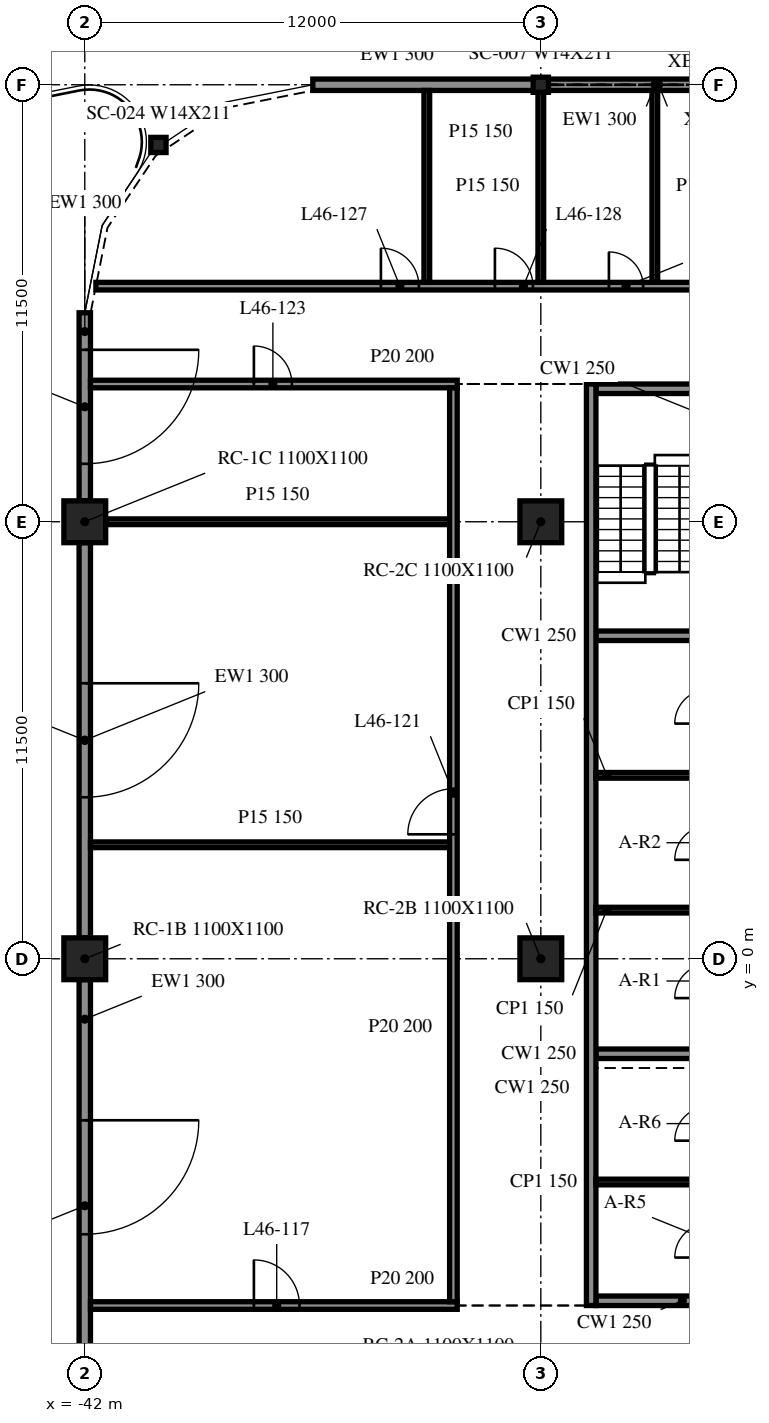
"""IFC4 building model, lengths in metres.
Left out: names, types, materials, properties, quantities, classifications, styles, units other than length and angle.
Written with IfcOpenShell. Run it as: python <this file> out.ifc"""

import sys

from ifc_helpers import new_model, si_unit, direction, frame, frame_2d, origin, origin_2d, place, context, subcontext, project, spatial, rectangle, i_section, extrude, element, fill, save


model = new_model("IFC4")
c1 = context("Model", 3, precision=1e-05, world=origin(), true_north=direction((0.0, 1.0)))
c2 = subcontext(c1, "Body", "Model", "MODEL_VIEW")
j1 = project(units=[si_unit("LENGTHUNIT", "METRE"), si_unit("PLANEANGLEUNIT", "RADIAN")], contexts=[c1])
p1 = place(None, origin())
s1 = spatial("IfcSite", under=j1, at=p1, CompositionType="ELEMENT")
p2 = place(p1, origin())
s2 = spatial("IfcBuilding", under=s1, at=p2, CompositionType="ELEMENT")
p3 = place(p2, frame((0.0, 0.0, 193.9)))
s3 = spatial("IfcBuildingStorey", under=s2, at=p3, CompositionType="ELEMENT", Elevation=193.9)
for number, where, z_axis, x_axis in (
    (1, (-42.0, 0.0, -0.34), (0.0, 0.0, 1.0), (1.0, 0.0, 0.0)),
    (2, (-42.0, 11.5, -0.34), (0.0, 0.0, 1.0), (1.0, 0.0, 0.0)),
    (3, (-30.0, 0.0, -0.34), (0.0, 0.0, 1.0), (1.0, 0.0, 0.0)),
    (4, (-30.0, 11.5, -0.34), (0.0, 0.0, 1.0), (1.0, 0.0, 0.0)),
):
    element("IfcColumn", number, at=place(p3, frame(where, z_axis=z_axis, x_axis=x_axis)), inside=s3, PredefinedType="COLUMN", context=c2, shape_type="SweptSolid", body=[
        extrude(rectangle(XDim=1.1, YDim=1.1, at=origin_2d()), origin(), (0.0, 0.0, 1.0), 3.8),
    ])
for number, where, z_axis, x_axis in (
    (5, (-30.0, 23.0, -0.34), (0.0, 0.0, 1.0), (1.0, 0.0, 0.0)),
    (6, (-40.062, 21.416, -0.34), (0.0, 0.0, 1.0), (1.0, 0.0, 0.0)),
):
    element("IfcColumn", number, at=place(p3, frame(where, z_axis=z_axis, x_axis=x_axis)), inside=s3, PredefinedType="COLUMN", context=c2, shape_type="SweptSolid", body=[
        extrude(i_section(OverallWidth=0.401, OverallDepth=0.399, WebThickness=0.025, FlangeThickness=0.04, at=origin_2d()), origin(), (0.0, 0.0, 1.0), 3.8),
    ])
p4 = place(p3, frame((-18.012, 23.0, 0.0), z_axis=(0.0, 0.0, 1.0), x_axis=(-1.0, 0.0, 0.0)))
e7 = element("IfcWall", 7, at=p4, inside=s3, PredefinedType="NOTDEFINED", context=c2, shape_type="SweptSolid", body=[
    extrude(rectangle(XDim=11.975, YDim=0.3, at=frame_2d((5.988, 0.0))), origin(), (0.0, 0.0, 1.0), 2.782),
])
p5 = place(p3, frame((-30.012, 23.0, 0.0), z_axis=(0.0, 0.0, 1.0), x_axis=(-1.0, 0.0, 0.0)))
e8 = element("IfcWall", 8, at=p5, inside=s3, PredefinedType="NOTDEFINED", context=c2, shape_type="SweptSolid", body=[
    extrude(rectangle(XDim=5.988, YDim=0.3, at=frame_2d((2.994, 0.0))), origin(), (0.0, 0.0, 1.0), 2.782),
])
p6 = place(p3, frame((-42.0, 17.0, 0.0), z_axis=(0.0, 0.0, 1.0), x_axis=(0.0, -1.0, 0.0)))
e9 = element("IfcWall", 9, at=p6, inside=s3, PredefinedType="NOTDEFINED", context=c2, shape_type="SweptSolid", body=[
    extrude(rectangle(XDim=4.95, YDim=0.3, at=frame_2d((2.475, 0.0))), origin(), (0.0, 0.0, 1.0), 2.782),
])
p7 = place(p6, frame((0.975, 0.0, 0.0)))
e10 = element("IfcOpeningElement", 10, at=p7, cuts=e9, PredefinedType="OPENING", context=c2, shape_type="SweptSolid", body=[
    extrude(rectangle(XDim=3.0, YDim=2.4, at=frame_2d((1.5, 1.2))), frame((0.0, 0.16, 0.0), z_axis=(0.0, -1.0, 0.0), x_axis=(1.0, 0.0, 0.0)), (0.0, 0.0, 1.0), 0.32),
])
p8 = place(p3, frame((-42.0, 10.95, 0.0), z_axis=(0.0, 0.0, 1.0), x_axis=(0.0, -1.0, 0.0)))
e11 = element("IfcWall", 11, at=p8, inside=s3, PredefinedType="NOTDEFINED", context=c2, shape_type="SweptSolid", body=[
    extrude(rectangle(XDim=10.4, YDim=0.3, at=frame_2d((5.2, 0.0))), origin(), (0.0, 0.0, 1.0), 2.782),
])
p9 = place(p8, frame((3.7, 0.0, 0.0)))
e12 = element("IfcOpeningElement", 12, at=p9, cuts=e11, PredefinedType="OPENING", context=c2, shape_type="SweptSolid", body=[
    extrude(rectangle(XDim=3.0, YDim=2.4, at=frame_2d((1.5, 1.2))), frame((0.0, 0.16, 0.0), z_axis=(0.0, -1.0, 0.0), x_axis=(1.0, 0.0, 0.0)), (0.0, 0.0, 1.0), 0.32),
])
p10 = place(p3, frame((-42.0, -0.55, 0.0), z_axis=(0.0, 0.0, 1.0), x_axis=(0.0, -1.0, 0.0)))
e13 = element("IfcWall", 13, at=p10, inside=s3, PredefinedType="NOTDEFINED", context=c2, shape_type="SweptSolid", body=[
    extrude(rectangle(XDim=10.4, YDim=0.3, at=frame_2d((5.2, 0.0))), origin(), (0.0, 0.0, 1.0), 2.782),
])
p11 = place(p10, frame((3.7, 0.0, 0.0)))
e14 = element("IfcOpeningElement", 14, at=p11, cuts=e13, PredefinedType="OPENING", context=c2, shape_type="SweptSolid", body=[
    extrude(rectangle(XDim=3.0, YDim=2.4, at=frame_2d((1.5, 1.2))), frame((0.0, 0.16, 0.0), z_axis=(0.0, -1.0, 0.0), x_axis=(1.0, 0.0, 0.0)), (0.0, 0.0, 1.0), 0.32),
])
p12 = place(p3, frame((-28.675, 15.125, 0.0), z_axis=(0.0, 0.0, 1.0), x_axis=(0.0, -1.0, 0.0)))
e15 = element("IfcWall", 15, at=p12, inside=s3, PredefinedType="SOLIDWALL", context=c2, shape_type="SweptSolid", body=[
    extrude(rectangle(XDim=24.25, YDim=0.25, at=frame_2d((12.125, 0.0))), origin(), (0.0, 0.0, 1.0), 3.46),
])
p13 = place(p3, frame((-19.45, -9.0, 0.0), z_axis=(0.0, 0.0, 1.0), x_axis=(-1.0, 0.0, 0.0)))
e16 = element("IfcWall", 16, at=p13, inside=s3, PredefinedType="SOLIDWALL", context=c2, shape_type="SweptSolid", body=[
    extrude(rectangle(XDim=9.1, YDim=0.25, at=frame_2d((4.55, 0.0))), origin(), (0.0, 0.0, 1.0), 3.46),
])
p14 = place(p13, frame((3.65, 0.0, 0.0)))
e17 = element("IfcOpeningElement", 17, at=p14, cuts=e16, PredefinedType="OPENING", context=c2, shape_type="SweptSolid", body=[
    extrude(rectangle(XDim=1.8, YDim=2.1, at=frame_2d((0.9, 1.05))), frame((0.0, 0.135, 0.0), z_axis=(0.0, -1.0, 0.0), x_axis=(1.0, 0.0, 0.0)), (0.0, 0.0, 1.0), 0.27),
])
p15 = place(p3, frame((-28.55, 15.0, 0.0), z_axis=(0.0, 0.0, 1.0), x_axis=(1.0, 0.0, 0.0)))
e18 = element("IfcWall", 18, at=p15, inside=s3, PredefinedType="SOLIDWALL", context=c2, shape_type="SweptSolid", body=[
    extrude(rectangle(XDim=9.1, YDim=0.25, at=frame_2d((4.55, 0.0))), origin(), (0.0, 0.0, 1.0), 3.46),
])
p16 = place(p15, frame((3.65, 0.0, 0.0)))
e19 = element("IfcOpeningElement", 19, at=p16, cuts=e18, PredefinedType="OPENING", context=c2, shape_type="SweptSolid", body=[
    extrude(rectangle(XDim=1.8, YDim=2.1, at=frame_2d((0.9, 1.05))), frame((0.0, 0.135, 0.0), z_axis=(0.0, -1.0, 0.0), x_axis=(1.0, 0.0, 0.0)), (0.0, 0.0, 1.0), 0.27),
])
for number, where, z_axis, x_axis in (
    (20, (-28.55, -2.5, 0.0), (0.0, 0.0, 1.0), (1.0, 0.0, 0.0)),
    (21, (-28.55, 8.5, 0.0), (0.0, 0.0, 1.0), (1.0, 0.0, 0.0)),
):
    element("IfcWall", number, at=place(p3, frame(where, z_axis=z_axis, x_axis=x_axis)), inside=s3, PredefinedType="SOLIDWALL", context=c2, shape_type="SweptSolid", body=[
        extrude(rectangle(XDim=2.85, YDim=0.25, at=frame_2d((1.425, 0.0))), origin(), (0.0, 0.0, 1.0), 3.46),
    ])
for number, where, z_axis, x_axis in (
    (22, (-28.55, 1.28, 0.0), (0.0, 0.0, 1.0), (1.0, 0.0, 0.0)),
    (23, (-28.55, 4.827, 0.0), (0.0, 0.0, 1.0), (1.0, 0.0, 0.0)),
    (24, (-28.55, -5.875, 0.0), (0.0, 0.0, 1.0), (1.0, 0.0, 0.0)),
):
    element("IfcWall", number, at=place(p3, frame(where, z_axis=z_axis, x_axis=x_axis)), inside=s3, PredefinedType="PARTITIONING", context=c2, shape_type="SweptSolid", body=[
        extrude(rectangle(XDim=2.85, YDim=0.15, at=frame_2d((1.425, 0.0))), origin(), (0.0, 0.0, 1.0), 3.46),
    ])
p17 = place(p3, frame((-41.85, -9.125, 0.0), z_axis=(0.0, 0.0, 1.0), x_axis=(1.0, 0.0, 0.0)))
e25 = element("IfcWall", 25, at=p17, inside=s3, PredefinedType="PARTITIONING", context=c2, shape_type="SweptSolid", body=[
    extrude(rectangle(XDim=9.65, YDim=0.2, at=frame_2d((4.825, 0.0))), origin(), (0.0, 0.0, 1.0), 3.46),
])
p18 = place(p17, frame((4.3, 0.0, 0.0)))
e26 = element("IfcOpeningElement", 26, at=p18, cuts=e25, PredefinedType="OPENING", context=c2, shape_type="SweptSolid", body=[
    extrude(rectangle(XDim=1.2, YDim=2.1, at=frame_2d((0.6, 1.05))), frame((0.0, 0.11, 0.0), z_axis=(0.0, -1.0, 0.0), x_axis=(1.0, 0.0, 0.0)), (0.0, 0.0, 1.0), 0.22),
])
p19 = place(p3, frame((-41.85, 3.0, 0.0), z_axis=(0.0, 0.0, 1.0), x_axis=(1.0, 0.0, 0.0)))
e27 = element("IfcWall", 27, at=p19, inside=s3, PredefinedType="PARTITIONING", context=c2, shape_type="SweptSolid", body=[
    extrude(rectangle(XDim=9.45, YDim=0.15, at=frame_2d((4.725, 0.0))), origin(), (0.0, 0.0, 1.0), 3.46),
])
p20 = place(p3, frame((-41.45, 11.5, 0.0), z_axis=(0.0, 0.0, 1.0), x_axis=(1.0, 0.0, 0.0)))
e28 = element("IfcWall", 28, at=p20, inside=s3, PredefinedType="PARTITIONING", context=c2, shape_type="SweptSolid", body=[
    extrude(rectangle(XDim=9.05, YDim=0.15, at=frame_2d((4.525, 0.0))), origin(), (0.0, 0.0, 1.0), 3.46),
])
p21 = place(p3, frame((-41.85, 15.125, 0.0), z_axis=(0.0, 0.0, 1.0), x_axis=(1.0, 0.0, 0.0)))
e29 = element("IfcWall", 29, at=p21, inside=s3, PredefinedType="PARTITIONING", context=c2, shape_type="SweptSolid", body=[
    extrude(rectangle(XDim=9.65, YDim=0.2, at=frame_2d((4.825, 0.0))), origin(), (0.0, 0.0, 1.0), 3.46),
])
p22 = place(p21, frame((4.3, 0.0, 0.0)))
e30 = element("IfcOpeningElement", 30, at=p22, cuts=e29, PredefinedType="OPENING", context=c2, shape_type="SweptSolid", body=[
    extrude(rectangle(XDim=1.0, YDim=2.1, at=frame_2d((0.5, 1.05))), frame((0.0, 0.11, 0.0), z_axis=(0.0, -1.0, 0.0), x_axis=(1.0, 0.0, 0.0)), (0.0, 0.0, 1.0), 0.22),
])
p23 = place(p3, frame((-41.708, 17.7, 0.0), z_axis=(0.0, 0.0, 1.0), x_axis=(1.0, 0.0, 0.0)))
e31 = element("IfcWall", 31, at=p23, inside=s3, PredefinedType="PARTITIONING", context=c2, shape_type="SweptSolid", body=[
    extrude(rectangle(XDim=95.416, YDim=0.2, at=frame_2d((47.708, 0.0))), origin(), (0.0, 0.0, 1.0), 3.46),
])
p24 = place(p23, frame((7.5, 0.0, 0.0)))
e32 = element("IfcOpeningElement", 32, at=p24, cuts=e31, PredefinedType="OPENING", context=c2, shape_type="SweptSolid", body=[
    extrude(rectangle(XDim=1.0, YDim=2.1, at=frame_2d((0.5, 1.05))), frame((0.0, 0.11, 0.0), z_axis=(0.0, -1.0, 0.0), x_axis=(1.0, 0.0, 0.0)), (0.0, 0.0, 1.0), 0.22),
])
p25 = place(p23, frame((10.5, 0.0, 0.0)))
e33 = element("IfcOpeningElement", 33, at=p25, cuts=e31, PredefinedType="OPENING", context=c2, shape_type="SweptSolid", body=[
    extrude(rectangle(XDim=1.0, YDim=2.1, at=frame_2d((0.5, 1.05))), frame((0.0, 0.11, 0.0), z_axis=(0.0, -1.0, 0.0), x_axis=(1.0, 0.0, 0.0)), (0.0, 0.0, 1.0), 0.22),
])
p26 = place(p23, frame((13.5, 0.0, 0.0)))
e34 = element("IfcOpeningElement", 34, at=p26, cuts=e31, PredefinedType="OPENING", context=c2, shape_type="SweptSolid", body=[
    extrude(rectangle(XDim=0.9, YDim=2.1, at=frame_2d((0.45, 1.05))), frame((0.0, 0.11, 0.0), z_axis=(0.0, -1.0, 0.0), x_axis=(1.0, 0.0, 0.0)), (0.0, 0.0, 1.0), 0.22),
])
p27 = place(p23, frame((22.3, 0.0, 0.0)))
e35 = element("IfcOpeningElement", 35, at=p27, cuts=e31, PredefinedType="OPENING", context=c2, shape_type="SweptSolid", body=[
    extrude(rectangle(XDim=1.2, YDim=2.1, at=frame_2d((0.6, 1.05))), frame((0.0, 0.11, 0.0), z_axis=(0.0, -1.0, 0.0), x_axis=(1.0, 0.0, 0.0)), (0.0, 0.0, 1.0), 0.22),
])
p28 = place(p23, frame((28.5, 0.0, 0.0)))
e36 = element("IfcOpeningElement", 36, at=p28, cuts=e31, PredefinedType="OPENING", context=c2, shape_type="SweptSolid", body=[
    extrude(rectangle(XDim=0.9, YDim=2.1, at=frame_2d((0.45, 1.05))), frame((0.0, 0.11, 0.0), z_axis=(0.0, -1.0, 0.0), x_axis=(1.0, 0.0, 0.0)), (0.0, 0.0, 1.0), 0.22),
])
p29 = place(p23, frame((37.5, 0.0, 0.0)))
e37 = element("IfcOpeningElement", 37, at=p29, cuts=e31, PredefinedType="OPENING", context=c2, shape_type="SweptSolid", body=[
    extrude(rectangle(XDim=1.0, YDim=2.1, at=frame_2d((0.5, 1.05))), frame((0.0, 0.11, 0.0), z_axis=(0.0, -1.0, 0.0), x_axis=(1.0, 0.0, 0.0)), (0.0, 0.0, 1.0), 0.22),
])
p30 = place(p23, frame((40.5, 0.0, 0.0)))
e38 = element("IfcOpeningElement", 38, at=p30, cuts=e31, PredefinedType="OPENING", context=c2, shape_type="SweptSolid", body=[
    extrude(rectangle(XDim=1.0, YDim=2.1, at=frame_2d((0.5, 1.05))), frame((0.0, 0.11, 0.0), z_axis=(0.0, -1.0, 0.0), x_axis=(1.0, 0.0, 0.0)), (0.0, 0.0, 1.0), 0.22),
])
p31 = place(p23, frame((43.5, 0.0, 0.0)))
e39 = element("IfcOpeningElement", 39, at=p31, cuts=e31, PredefinedType="OPENING", context=c2, shape_type="SweptSolid", body=[
    extrude(rectangle(XDim=0.9, YDim=2.1, at=frame_2d((0.45, 1.05))), frame((0.0, 0.11, 0.0), z_axis=(0.0, -1.0, 0.0), x_axis=(1.0, 0.0, 0.0)), (0.0, 0.0, 1.0), 0.22),
])
p32 = place(p23, frame((47.1, 0.0, 0.0)))
e40 = element("IfcOpeningElement", 40, at=p32, cuts=e31, PredefinedType="OPENING", context=c2, shape_type="SweptSolid", body=[
    extrude(rectangle(XDim=1.2, YDim=2.1, at=frame_2d((0.6, 1.05))), frame((0.0, 0.11, 0.0), z_axis=(0.0, -1.0, 0.0), x_axis=(1.0, 0.0, 0.0)), (0.0, 0.0, 1.0), 0.22),
])
p33 = place(p23, frame((54.1, 0.0, 0.0)))
e41 = element("IfcOpeningElement", 41, at=p33, cuts=e31, PredefinedType="OPENING", context=c2, shape_type="SweptSolid", body=[
    extrude(rectangle(XDim=0.9, YDim=2.1, at=frame_2d((0.45, 1.05))), frame((0.0, 0.11, 0.0), z_axis=(0.0, -1.0, 0.0), x_axis=(1.0, 0.0, 0.0)), (0.0, 0.0, 1.0), 0.22),
])
p34 = place(p23, frame((60.1, 0.0, 0.0)))
e42 = element("IfcOpeningElement", 42, at=p34, cuts=e31, PredefinedType="OPENING", context=c2, shape_type="SweptSolid", body=[
    extrude(rectangle(XDim=1.0, YDim=2.1, at=frame_2d((0.5, 1.05))), frame((0.0, 0.11, 0.0), z_axis=(0.0, -1.0, 0.0), x_axis=(1.0, 0.0, 0.0)), (0.0, 0.0, 1.0), 0.22),
])
p35 = place(p23, frame((69.1, 0.0, 0.0)))
e43 = element("IfcOpeningElement", 43, at=p35, cuts=e31, PredefinedType="OPENING", context=c2, shape_type="SweptSolid", body=[
    extrude(rectangle(XDim=1.0, YDim=2.1, at=frame_2d((0.5, 1.05))), frame((0.0, 0.11, 0.0), z_axis=(0.0, -1.0, 0.0), x_axis=(1.0, 0.0, 0.0)), (0.0, 0.0, 1.0), 0.22),
])
p36 = place(p23, frame((72.1, 0.0, 0.0)))
e44 = element("IfcOpeningElement", 44, at=p36, cuts=e31, PredefinedType="OPENING", context=c2, shape_type="SweptSolid", body=[
    extrude(rectangle(XDim=0.9, YDim=2.1, at=frame_2d((0.45, 1.05))), frame((0.0, 0.11, 0.0), z_axis=(0.0, -1.0, 0.0), x_axis=(1.0, 0.0, 0.0)), (0.0, 0.0, 1.0), 0.22),
])
p37 = place(p23, frame((75.1, 0.0, 0.0)))
e45 = element("IfcOpeningElement", 45, at=p37, cuts=e31, PredefinedType="OPENING", context=c2, shape_type="SweptSolid", body=[
    extrude(rectangle(XDim=1.2, YDim=2.1, at=frame_2d((0.6, 1.05))), frame((0.0, 0.11, 0.0), z_axis=(0.0, -1.0, 0.0), x_axis=(1.0, 0.0, 0.0)), (0.0, 0.0, 1.0), 0.22),
])
p38 = place(p23, frame((84.1, 0.0, 0.0)))
e46 = element("IfcOpeningElement", 46, at=p38, cuts=e31, PredefinedType="OPENING", context=c2, shape_type="SweptSolid", body=[
    extrude(rectangle(XDim=0.9, YDim=2.1, at=frame_2d((0.45, 1.05))), frame((0.0, 0.11, 0.0), z_axis=(0.0, -1.0, 0.0), x_axis=(1.0, 0.0, 0.0)), (0.0, 0.0, 1.0), 0.22),
])
p39 = place(p23, frame((90.1, 0.0, 0.0)))
e47 = element("IfcOpeningElement", 47, at=p39, cuts=e31, PredefinedType="OPENING", context=c2, shape_type="SweptSolid", body=[
    extrude(rectangle(XDim=1.0, YDim=2.1, at=frame_2d((0.5, 1.05))), frame((0.0, 0.11, 0.0), z_axis=(0.0, -1.0, 0.0), x_axis=(1.0, 0.0, 0.0)), (0.0, 0.0, 1.0), 0.22),
])
p40 = place(p3, frame((-33.0, 17.8, 0.0), z_axis=(0.0, 0.0, 1.0), x_axis=(0.0, 1.0, 0.0)))
e48 = element("IfcWall", 48, at=p40, inside=s3, PredefinedType="PARTITIONING", context=c2, shape_type="SweptSolid", body=[
    extrude(rectangle(XDim=5.05, YDim=0.15, at=frame_2d((2.525, 0.0))), origin(), (0.0, 0.0, 1.0), 3.46),
])
p41 = place(p3, frame((-32.3, -9.025, 0.0), z_axis=(0.0, 0.0, 1.0), x_axis=(0.0, 1.0, 0.0)))
e49 = element("IfcWall", 49, at=p41, inside=s3, PredefinedType="PARTITIONING", context=c2, shape_type="SweptSolid", body=[
    extrude(rectangle(XDim=24.05, YDim=0.2, at=frame_2d((12.025, 0.0))), origin(), (0.0, 0.0, 1.0), 3.46),
])
p42 = place(p41, frame((12.3, 0.0, 0.0)))
e50 = element("IfcOpeningElement", 50, at=p42, cuts=e49, PredefinedType="OPENING", context=c2, shape_type="SweptSolid", body=[
    extrude(rectangle(XDim=1.2, YDim=2.1, at=frame_2d((0.6, 1.05))), frame((0.0, 0.11, 0.0), z_axis=(0.0, -1.0, 0.0), x_axis=(1.0, 0.0, 0.0)), (0.0, 0.0, 1.0), 0.22),
])
for number, where, z_axis, x_axis in (
    (51, (-30.0, 17.8, 0.0), (0.0, 0.0, 1.0), (0.0, 1.0, 0.0)),
    (52, (-27.0, 17.8, 0.0), (0.0, 0.0, 1.0), (0.0, 1.0, 0.0)),
):
    element("IfcWall", number, at=place(p3, frame(where, z_axis=z_axis, x_axis=x_axis)), inside=s3, PredefinedType="PARTITIONING", context=c2, shape_type="SweptSolid", body=[
        extrude(rectangle(XDim=5.05, YDim=0.15, at=frame_2d((2.525, 0.0))), origin(), (0.0, 0.0, 1.0), 3.46),
    ])
p43 = place(p7, origin())
e53 = element("IfcDoor", 53, at=p43, inside=s3, OperationType="SINGLE_SWING_LEFT", PredefinedType="DOOR", context=c2, shape_type="SweptSolid", body=[
    extrude(rectangle(XDim=3.0, YDim=2.4, at=frame_2d((1.5, 1.2))), frame((0.0, 0.025, 0.0), z_axis=(0.0, -1.0, 0.0), x_axis=(1.0, 0.0, 0.0)), (0.0, 0.0, 1.0), 0.05),
])
fill(e10, e53)
p44 = place(p9, origin())
e54 = element("IfcDoor", 54, at=p44, inside=s3, OperationType="SINGLE_SWING_LEFT", PredefinedType="DOOR", context=c2, shape_type="SweptSolid", body=[
    extrude(rectangle(XDim=3.0, YDim=2.4, at=frame_2d((1.5, 1.2))), frame((0.0, 0.025, 0.0), z_axis=(0.0, -1.0, 0.0), x_axis=(1.0, 0.0, 0.0)), (0.0, 0.0, 1.0), 0.05),
])
fill(e12, e54)
p45 = place(p11, origin())
e55 = element("IfcDoor", 55, at=p45, inside=s3, OperationType="SINGLE_SWING_LEFT", PredefinedType="DOOR", context=c2, shape_type="SweptSolid", body=[
    extrude(rectangle(XDim=3.0, YDim=2.4, at=frame_2d((1.5, 1.2))), frame((0.0, 0.025, 0.0), z_axis=(0.0, -1.0, 0.0), x_axis=(1.0, 0.0, 0.0)), (0.0, 0.0, 1.0), 0.05),
])
fill(e14, e55)
p46 = place(p18, origin())
e56 = element("IfcDoor", 56, at=p46, inside=s3, OperationType="SINGLE_SWING_RIGHT", PredefinedType="DOOR", context=c2, shape_type="SweptSolid", body=[
    extrude(rectangle(XDim=1.2, YDim=2.1, at=frame_2d((0.6, 1.05))), frame((0.0, 0.025, 0.0), z_axis=(0.0, -1.0, 0.0), x_axis=(1.0, 0.0, 0.0)), (0.0, 0.0, 1.0), 0.05),
])
fill(e26, e56)
p47 = place(p42, origin())
e57 = element("IfcDoor", 57, at=p47, inside=s3, OperationType="SINGLE_SWING_RIGHT", PredefinedType="DOOR", context=c2, shape_type="SweptSolid", body=[
    extrude(rectangle(XDim=1.2, YDim=2.1, at=frame_2d((0.6, 1.05))), frame((0.0, 0.025, 0.0), z_axis=(0.0, -1.0, 0.0), x_axis=(1.0, 0.0, 0.0)), (0.0, 0.0, 1.0), 0.05),
])
fill(e50, e57)
p48 = place(p22, origin())
e58 = element("IfcDoor", 58, at=p48, inside=s3, OperationType="SINGLE_SWING_RIGHT", PredefinedType="DOOR", context=c2, shape_type="SweptSolid", body=[
    extrude(rectangle(XDim=1.0, YDim=2.1, at=frame_2d((0.5, 1.05))), frame((0.0, 0.025, 0.0), z_axis=(0.0, -1.0, 0.0), x_axis=(1.0, 0.0, 0.0)), (0.0, 0.0, 1.0), 0.05),
])
fill(e30, e58)
p49 = place(p24, origin())
e59 = element("IfcDoor", 59, at=p49, inside=s3, OperationType="SINGLE_SWING_LEFT", PredefinedType="DOOR", context=c2, shape_type="SweptSolid", body=[
    extrude(rectangle(XDim=1.0, YDim=2.1, at=frame_2d((0.5, 1.05))), frame((0.0, 0.025, 0.0), z_axis=(0.0, -1.0, 0.0), x_axis=(1.0, 0.0, 0.0)), (0.0, 0.0, 1.0), 0.05),
])
fill(e32, e59)
p50 = place(p25, origin())
e60 = element("IfcDoor", 60, at=p50, inside=s3, OperationType="SINGLE_SWING_LEFT", PredefinedType="DOOR", context=c2, shape_type="SweptSolid", body=[
    extrude(rectangle(XDim=1.0, YDim=2.1, at=frame_2d((0.5, 1.05))), frame((0.0, 0.025, 0.0), z_axis=(0.0, -1.0, 0.0), x_axis=(1.0, 0.0, 0.0)), (0.0, 0.0, 1.0), 0.05),
])
fill(e33, e60)
p51 = place(p26, origin())
e61 = element("IfcDoor", 61, at=p51, inside=s3, OperationType="SINGLE_SWING_LEFT", PredefinedType="DOOR", context=c2, shape_type="SweptSolid", body=[
    extrude(rectangle(XDim=0.9, YDim=2.1, at=frame_2d((0.45, 1.05))), frame((0.0, 0.025, 0.0), z_axis=(0.0, -1.0, 0.0), x_axis=(1.0, 0.0, 0.0)), (0.0, 0.0, 1.0), 0.05),
])
fill(e34, e61)
save(model, sys.argv[1])
